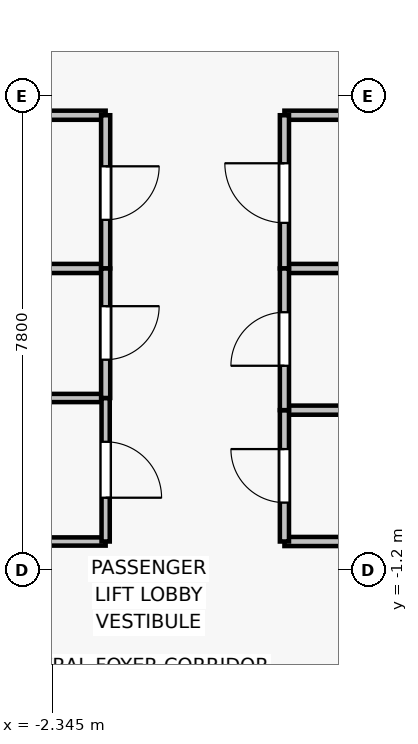
"""IFC4 building model, lengths in metres.
Left out: names, types, materials, properties, quantities, classifications, styles, units other than length and angle.
Written with IfcOpenShell. Run it as: python <this file> out.ifc"""

import sys

from ifc_helpers import new_model, si_unit, direction, frame, frame_2d, origin, place, context, subcontext, project, spatial, rectangle, extrude, source, transform, mapped, element, fill, save


model = new_model("IFC4")
c1 = context("Model", 3, precision=1e-05, world=origin(), true_north=direction((0.0, 1.0)))
c2 = subcontext(c1, "Body", "Model", "MODEL_VIEW")
j1 = project(units=[si_unit("LENGTHUNIT", "METRE"), si_unit("PLANEANGLEUNIT", "RADIAN")], contexts=[c1])
p1 = place(None, origin())
s1 = spatial("IfcSite", under=j1, at=p1, CompositionType="ELEMENT")
p2 = place(p1, origin())
s2 = spatial("IfcBuilding", under=s1, at=p2, CompositionType="ELEMENT")
p3 = place(p2, frame((0.0, 0.0, 241.9)))
s3 = spatial("IfcBuildingStorey", under=s2, at=p3, CompositionType="ELEMENT", Elevation=241.9)
for number, where, z_axis, x_axis in (
    (1, (-1.47, 3.76, 0.0), (0.0, 0.0, 1.0), (-1.0, 0.0, 0.0)),
    (2, (-3.87, 6.28, 0.0), (0.0, 0.0, 1.0), (1.0, 0.0, 0.0)),
):
    element("IfcWall", number, at=place(p3, frame(where, z_axis=z_axis, x_axis=x_axis)), inside=s3, PredefinedType="PARTITIONING", context=c2, shape_type="SweptSolid", body=[
        extrude(rectangle(XDim=2.4, YDim=0.15, at=frame_2d((1.2, 0.0))), origin(), (0.0, 0.0, 1.0), 3.075),
    ])
p4 = place(p3, frame((-1.47, 6.28, 0.0), z_axis=(0.0, 0.0, 1.0), x_axis=(0.0, -1.0, 0.0)))
e3 = element("IfcWall", 3, at=p4, inside=s3, PredefinedType="PARTITIONING", context=c2, shape_type="SweptSolid", body=[
    extrude(rectangle(XDim=2.52, YDim=0.15, at=frame_2d((1.26, 0.0))), origin(), (0.0, 0.0, 1.0), 3.075),
])
p5 = place(p4, frame((0.84, 0.0, 0.0)))
e4 = element("IfcOpeningElement", 4, at=p5, cuts=e3, PredefinedType="OPENING", context=c2, shape_type="SweptSolid", body=[
    extrude(rectangle(XDim=0.88, YDim=2.1, at=frame_2d((0.44, 1.05))), frame((0.0, 0.085, 0.0), z_axis=(0.0, -1.0, 0.0), x_axis=(1.0, 0.0, 0.0)), (0.0, 0.0, 1.0), 0.17),
])
for number, where, z_axis, x_axis in (
    (5, (6.38, 3.76, 0.0), (0.0, 0.0, 1.0), (-1.0, 0.0, 0.0)),
    (6, (1.47, 6.28, 0.0), (0.0, 0.0, 1.0), (1.0, 0.0, 0.0)),
):
    element("IfcWall", number, at=place(p3, frame(where, z_axis=z_axis, x_axis=x_axis)), inside=s3, PredefinedType="PARTITIONING", context=c2, shape_type="SweptSolid", body=[
        extrude(rectangle(XDim=4.91, YDim=0.15, at=frame_2d((2.455, 0.0))), origin(), (0.0, 0.0, 1.0), 3.075),
    ])
p6 = place(p3, frame((1.47, 3.76, 0.0), z_axis=(0.0, 0.0, 1.0), x_axis=(0.0, 1.0, 0.0)))
e7 = element("IfcWall", 7, at=p6, inside=s3, PredefinedType="PARTITIONING", context=c2, shape_type="SweptSolid", body=[
    extrude(rectangle(XDim=2.52, YDim=0.15, at=frame_2d((1.26, 0.0))), origin(), (0.0, 0.0, 1.0), 3.075),
])
p7 = place(p6, frame((0.75, 0.0, 0.0)))
e8 = element("IfcOpeningElement", 8, at=p7, cuts=e7, PredefinedType="OPENING", context=c2, shape_type="SweptSolid", body=[
    extrude(rectangle(XDim=0.98, YDim=2.15, at=frame_2d((0.49, 1.075))), frame((0.0, 0.085, 0.0), z_axis=(0.0, -1.0, 0.0), x_axis=(1.0, 0.0, 0.0)), (0.0, 0.0, 1.0), 0.17),
])
for number, where, z_axis, x_axis in (
    (9, (-1.47, -0.73, 0.0), (0.0, 0.0, 1.0), (-1.0, 0.0, 0.0)),
    (10, (-3.47, 1.63, 0.0), (0.0, 0.0, 1.0), (1.0, 0.0, 0.0)),
):
    element("IfcWall", number, at=place(p3, frame(where, z_axis=z_axis, x_axis=x_axis)), inside=s3, PredefinedType="PARTITIONING", context=c2, shape_type="SweptSolid", body=[
        extrude(rectangle(XDim=2.0, YDim=0.135, at=frame_2d((1.0, 0.0))), origin(), (0.0, 0.0, 1.0), 3.075),
    ])
p8 = place(p3, frame((-1.47, 1.63, 0.0), z_axis=(0.0, 0.0, 1.0), x_axis=(0.0, -1.0, 0.0)))
e11 = element("IfcWall", 11, at=p8, inside=s3, PredefinedType="PARTITIONING", context=c2, shape_type="SweptSolid", body=[
    extrude(rectangle(XDim=2.36, YDim=0.135, at=frame_2d((1.18, 0.0))), origin(), (0.0, 0.0, 1.0), 3.075),
])
p9 = place(p8, frame((0.72, 0.0, 0.0)))
e12 = element("IfcOpeningElement", 12, at=p9, cuts=e11, PredefinedType="OPENING", context=c2, shape_type="SweptSolid", body=[
    extrude(rectangle(XDim=0.92, YDim=2.1, at=frame_2d((0.46, 1.05))), frame((0.0, 0.077, 0.0), z_axis=(0.0, -1.0, 0.0), x_axis=(1.0, 0.0, 0.0)), (0.0, 0.0, 1.0), 0.155),
])
p10 = place(p3, frame((-1.47, 3.76, 0.0), z_axis=(0.0, 0.0, 1.0), x_axis=(0.0, -1.0, 0.0)))
e13 = element("IfcWall", 13, at=p10, inside=s3, PredefinedType="PARTITIONING", context=c2, shape_type="SweptSolid", body=[
    extrude(rectangle(XDim=2.13, YDim=0.15, at=frame_2d((1.065, 0.0))), origin(), (0.0, 0.0, 1.0), 3.075),
])
p11 = place(p10, frame((0.62, 0.0, 0.0)))
e14 = element("IfcOpeningElement", 14, at=p11, cuts=e13, PredefinedType="OPENING", context=c2, shape_type="SweptSolid", body=[
    extrude(rectangle(XDim=0.88, YDim=2.1, at=frame_2d((0.44, 1.05))), frame((0.0, 0.085, 0.0), z_axis=(0.0, -1.0, 0.0), x_axis=(1.0, 0.0, 0.0)), (0.0, 0.0, 1.0), 0.17),
])
for number, where, z_axis, x_axis in (
    (15, (3.68, -0.73, 0.0), (0.0, 0.0, 1.0), (-1.0, 0.0, 0.0)),
    (16, (1.47, 1.43, 0.0), (0.0, 0.0, 1.0), (1.0, 0.0, 0.0)),
):
    element("IfcWall", number, at=place(p3, frame(where, z_axis=z_axis, x_axis=x_axis)), inside=s3, PredefinedType="PARTITIONING", context=c2, shape_type="SweptSolid", body=[
        extrude(rectangle(XDim=2.21, YDim=0.15, at=frame_2d((1.105, 0.0))), origin(), (0.0, 0.0, 1.0), 3.075),
    ])
p12 = place(p3, frame((1.47, -0.73, 0.0), z_axis=(0.0, 0.0, 1.0), x_axis=(0.0, 1.0, 0.0)))
e17 = element("IfcWall", 17, at=p12, inside=s3, PredefinedType="PARTITIONING", context=c2, shape_type="SweptSolid", body=[
    extrude(rectangle(XDim=2.16, YDim=0.15, at=frame_2d((1.08, 0.0))), origin(), (0.0, 0.0, 1.0), 3.075),
])
p13 = place(p12, frame((0.64, 0.0, 0.0)))
e18 = element("IfcOpeningElement", 18, at=p13, cuts=e17, PredefinedType="OPENING", context=c2, shape_type="SweptSolid", body=[
    extrude(rectangle(XDim=0.88, YDim=2.1, at=frame_2d((0.44, 1.05))), frame((0.0, 0.085, 0.0), z_axis=(0.0, -1.0, 0.0), x_axis=(1.0, 0.0, 0.0)), (0.0, 0.0, 1.0), 0.17),
])
p14 = place(p3, frame((1.47, 1.43, 0.0), z_axis=(0.0, 0.0, 1.0), x_axis=(0.0, 1.0, 0.0)))
e19 = element("IfcWall", 19, at=p14, inside=s3, PredefinedType="PARTITIONING", context=c2, shape_type="SweptSolid", body=[
    extrude(rectangle(XDim=2.33, YDim=0.15, at=frame_2d((1.165, 0.0))), origin(), (0.0, 0.0, 1.0), 3.075),
])
p15 = place(p14, frame((0.73, 0.0, 0.0)))
e20 = element("IfcOpeningElement", 20, at=p15, cuts=e19, PredefinedType="OPENING", context=c2, shape_type="SweptSolid", body=[
    extrude(rectangle(XDim=0.88, YDim=2.15, at=frame_2d((0.44, 1.075))), frame((0.0, 0.085, 0.0), z_axis=(0.0, -1.0, 0.0), x_axis=(1.0, 0.0, 0.0)), (0.0, 0.0, 1.0), 0.17),
])
m1 = source(origin(), c2, "Body", "SweptSolid", [
    extrude(rectangle(XDim=0.88, YDim=2.1, at=frame_2d((0.44, 1.05))), frame((0.0, 0.025, 0.0), z_axis=(0.0, -1.0, 0.0), x_axis=(1.0, 0.0, 0.0)), (0.0, 0.0, 1.0), 0.05),
])
p16 = place(p5, origin())
e21 = element("IfcDoor", 21, at=p16, inside=s3, OperationType="SINGLE_SWING_LEFT", PredefinedType="DOOR", context=c2, shape_type="MappedRepresentation", body=[
    mapped(m1, transform((0.0, 0.0, 0.0), x_axis=(1.0, 0.0, 0.0), y_axis=(0.0, 1.0, 0.0), z_axis=(0.0, 0.0, 1.0), scale=1.0)),
])
fill(e4, e21)
m2 = source(origin(), c2, "Body", "SweptSolid", [
    extrude(rectangle(XDim=0.98, YDim=2.15, at=frame_2d((0.49, 1.075))), frame((0.0, 0.025, 0.0), z_axis=(0.0, -1.0, 0.0), x_axis=(1.0, 0.0, 0.0)), (0.0, 0.0, 1.0), 0.05),
])
p17 = place(p7, origin())
e22 = element("IfcDoor", 22, at=p17, inside=s3, OperationType="SINGLE_SWING_RIGHT", PredefinedType="DOOR", context=c2, shape_type="MappedRepresentation", body=[
    mapped(m2, transform((0.0, 0.0, 0.0), x_axis=(1.0, 0.0, 0.0), y_axis=(0.0, 1.0, 0.0), z_axis=(0.0, 0.0, 1.0), scale=1.0)),
])
fill(e8, e22)
m3 = source(origin(), c2, "Body", "SweptSolid", [
    extrude(rectangle(XDim=0.92, YDim=2.1, at=frame_2d((0.46, 1.05))), frame((0.0, 0.025, 0.0), z_axis=(0.0, -1.0, 0.0), x_axis=(1.0, 0.0, 0.0)), (0.0, 0.0, 1.0), 0.05),
])
p18 = place(p9, origin())
e23 = element("IfcDoor", 23, at=p18, inside=s3, OperationType="SINGLE_SWING_RIGHT", PredefinedType="DOOR", context=c2, shape_type="MappedRepresentation", body=[
    mapped(m3, transform((0.0, 0.0, 0.0), x_axis=(1.0, 0.0, 0.0), y_axis=(0.0, 1.0, 0.0), z_axis=(0.0, 0.0, 1.0), scale=1.0)),
])
fill(e12, e23)
p19 = place(p11, origin())
e24 = element("IfcDoor", 24, at=p19, inside=s3, OperationType="SINGLE_SWING_LEFT", PredefinedType="DOOR", context=c2, shape_type="MappedRepresentation", body=[
    mapped(m1, transform((0.0, 0.0, 0.0), x_axis=(1.0, 0.0, 0.0), y_axis=(0.0, 1.0, 0.0), z_axis=(0.0, 0.0, 1.0), scale=1.0)),
])
fill(e14, e24)
p20 = place(p13, origin())
e25 = element("IfcDoor", 25, at=p20, inside=s3, OperationType="SINGLE_SWING_RIGHT", PredefinedType="DOOR", context=c2, shape_type="MappedRepresentation", body=[
    mapped(m1, transform((0.0, 0.0, 0.0), x_axis=(1.0, 0.0, 0.0), y_axis=(0.0, 1.0, 0.0), z_axis=(0.0, 0.0, 1.0), scale=1.0)),
])
fill(e18, e25)
m4 = source(origin(), c2, "Body", "SweptSolid", [
    extrude(rectangle(XDim=0.88, YDim=2.15, at=frame_2d((0.44, 1.075))), frame((0.0, 0.025, 0.0), z_axis=(0.0, -1.0, 0.0), x_axis=(1.0, 0.0, 0.0)), (0.0, 0.0, 1.0), 0.05),
])
p21 = place(p15, origin())
e26 = element("IfcDoor", 26, at=p21, inside=s3, OperationType="SINGLE_SWING_LEFT", PredefinedType="DOOR", context=c2, shape_type="MappedRepresentation", body=[
    mapped(m4, transform((0.0, 0.0, 0.0), x_axis=(1.0, 0.0, 0.0), y_axis=(0.0, 1.0, 0.0), z_axis=(0.0, 0.0, 1.0), scale=1.0)),
])
fill(e20, e26)
save(model, sys.argv[1])
